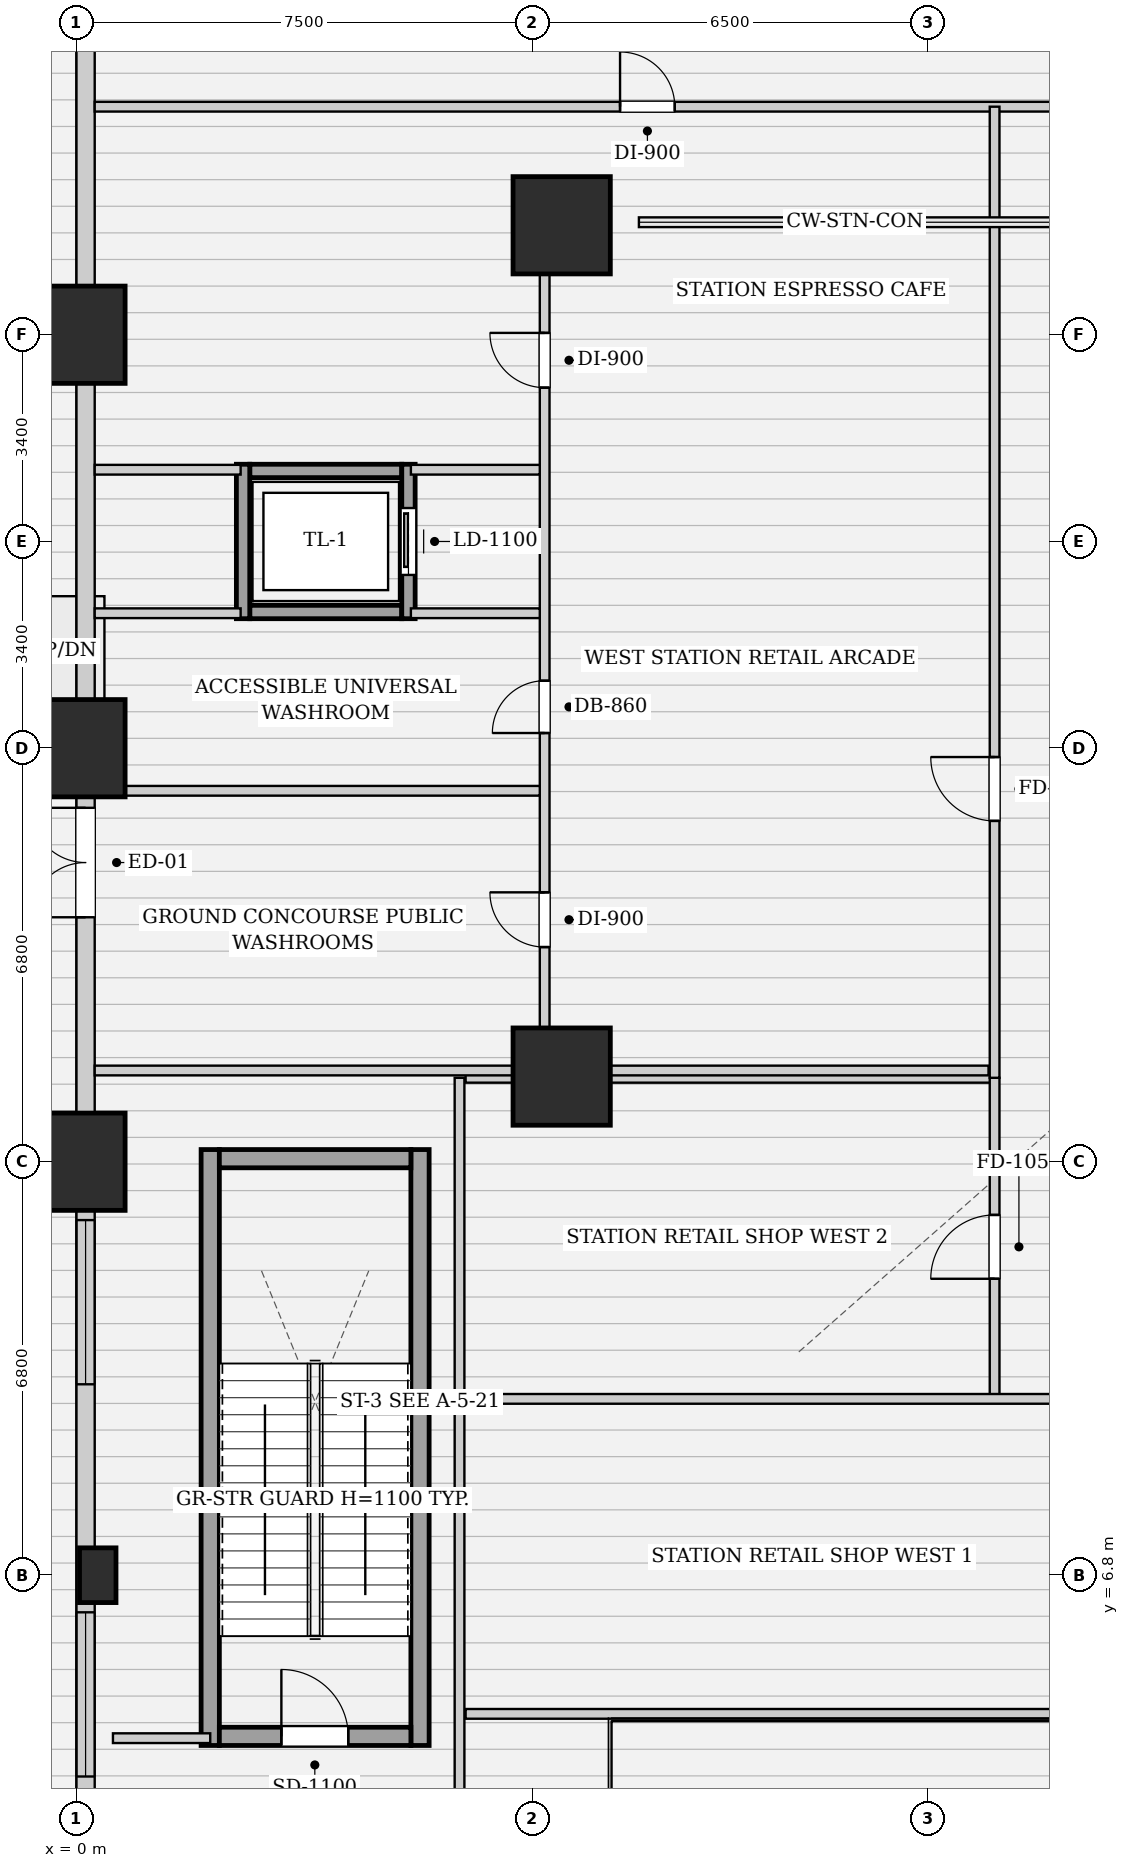
"""IFC4 building model, lengths in metres.
Left out: names, types, materials, properties, quantities, classifications, styles, units other than length and angle.
Written with IfcOpenShell. Run it as: python <this file> out.ifc"""

import sys

from ifc_helpers import new_model, si_unit, direction, frame, frame_2d, origin, origin_2d, place, context, subcontext, project, spatial, rectangle, extrude, element, fill, save


model = new_model("IFC4")
c1 = context("Model", 3, precision=1e-05, world=origin(), true_north=direction((0.0, 1.0)))
c2 = subcontext(c1, "Body", "Model", "MODEL_VIEW")
j1 = project(units=[si_unit("LENGTHUNIT", "METRE"), si_unit("PLANEANGLEUNIT", "RADIAN")], contexts=[c1])
p1 = place(None, origin())
s1 = spatial("IfcSite", under=j1, at=p1, CompositionType="ELEMENT")
p2 = place(p1, origin())
s2 = spatial("IfcBuilding", under=s1, at=p2, CompositionType="ELEMENT")
p3 = place(p2, origin())
s3 = spatial("IfcBuildingStorey", under=s2, at=p3, CompositionType="ELEMENT", Elevation=0.0)
for number, where, z_axis, x_axis in (
    (1, (0.0, 13.6, 0.0), (0.0, 0.0, 1.0), (1.0, 0.0, 0.0)),
    (2, (0.0, 20.4, 0.0), (0.0, 0.0, 1.0), (1.0, 0.0, 0.0)),
    (3, (0.0, 27.2, 0.0), (0.0, 0.0, 1.0), (1.0, 0.0, 0.0)),
    (4, (7.98, 15.0, 0.0), (0.0, 0.0, 1.0), (1.0, 0.0, 0.0)),
    (5, (7.98, 29.0, 0.0), (0.0, 0.0, 1.0), (1.0, 0.0, 0.0)),
):
    element("IfcColumn", number, at=place(p3, frame(where, z_axis=z_axis, x_axis=x_axis)), inside=s3, PredefinedType="COLUMN", context=c2, shape_type="SweptSolid", body=[
        extrude(rectangle(XDim=1.6, YDim=1.6, at=origin_2d()), origin(), (0.0, 0.0, 1.0), 6.0),
    ])
p4 = place(p3, frame((0.35, 6.8, 0.0), z_axis=(0.0, 0.0, 1.0), x_axis=(1.0, 0.0, 0.0)))
e6 = element("IfcColumn", 6, at=p4, inside=s3, PredefinedType="PILASTER", context=c2, shape_type="SweptSolid", body=[
    extrude(rectangle(XDim=0.6, YDim=0.9, at=origin_2d()), origin(), (0.0, 0.0, 1.0), 6.0),
])
p5 = place(p3, frame((0.15, 0.16, 0.0), z_axis=(0.0, 0.0, 1.0), x_axis=(0.0, 1.0, 0.0)))
e7 = element("IfcWall", 7, at=p5, inside=s3, PredefinedType="SOLIDWALL", context=c2, shape_type="SweptSolid", body=[
    extrude(rectangle(XDim=47.28, YDim=0.3, at=frame_2d((23.64, 0.0))), origin(), (0.0, 0.0, 1.0), 4.565),
])
p6 = place(p5, frame((17.46, 0.0, 0.0)))
e8 = element("IfcOpeningElement", 8, at=p6, cuts=e7, PredefinedType="OPENING", context=c2, shape_type="SweptSolid", body=[
    extrude(rectangle(XDim=1.8, YDim=2.2, at=frame_2d((0.9, 1.1))), frame((0.0, 0.16, 0.0), z_axis=(0.0, -1.0, 0.0), x_axis=(1.0, 0.0, 0.0)), (0.0, 0.0, 1.0), 0.32),
])
p7 = place(p5, frame((3.33, 0.0, 0.9)))
e9 = element("IfcOpeningElement", 9, at=p7, cuts=e7, PredefinedType="OPENING", context=c2, shape_type="SweptSolid", body=[
    extrude(rectangle(XDim=2.7, YDim=2.1, at=frame_2d((1.35, 1.05))), frame((0.0, 0.16, 0.0), z_axis=(0.0, -1.0, 0.0), x_axis=(1.0, 0.0, 0.0)), (0.0, 0.0, 1.0), 0.32),
])
p8 = place(p5, frame((9.78, 0.0, 0.9)))
e10 = element("IfcOpeningElement", 10, at=p8, cuts=e7, PredefinedType="OPENING", context=c2, shape_type="SweptSolid", body=[
    extrude(rectangle(XDim=2.7, YDim=2.1, at=frame_2d((1.35, 1.05))), frame((0.0, 0.16, 0.0), z_axis=(0.0, -1.0, 0.0), x_axis=(1.0, 0.0, 0.0)), (0.0, 0.0, 1.0), 0.32),
])
p9 = place(p5, frame((36.5, 0.0, 0.9)))
e11 = element("IfcOpeningElement", 11, at=p9, cuts=e7, PredefinedType="OPENING", context=c2, shape_type="SweptSolid", body=[
    extrude(rectangle(XDim=2.7, YDim=2.1, at=frame_2d((1.35, 1.05))), frame((0.0, 0.16, 0.0), z_axis=(0.0, -1.0, 0.0), x_axis=(1.0, 0.0, 0.0)), (0.0, 0.0, 1.0), 0.32),
])
p10 = place(p5, frame((43.0, 0.0, 0.9)))
e12 = element("IfcOpeningElement", 12, at=p10, cuts=e7, PredefinedType="OPENING", context=c2, shape_type="SweptSolid", body=[
    extrude(rectangle(XDim=2.7, YDim=2.1, at=frame_2d((1.35, 1.05))), frame((0.0, 0.16, 0.0), z_axis=(0.0, -1.0, 0.0), x_axis=(1.0, 0.0, 0.0)), (0.0, 0.0, 1.0), 0.32),
])
for number, where, z_axis, x_axis in (
    (13, (2.2, 4.0, 0.0), (0.0, 0.0, 1.0), (0.0, 1.0, 0.0)),
    (14, (5.65, 4.0, 0.0), (0.0, 0.0, 1.0), (0.0, 1.0, 0.0)),
):
    element("IfcWall", number, at=place(p3, frame(where, z_axis=z_axis, x_axis=x_axis)), inside=s3, PredefinedType="SHEAR", context=c2, shape_type="SweptSolid", body=[
        extrude(rectangle(XDim=9.8, YDim=0.3, at=frame_2d((4.9, 0.0))), origin(), (0.0, 0.0, 1.0), 5.68),
    ])
p11 = place(p3, frame((2.35, 13.65, 0.0), z_axis=(0.0, 0.0, 1.0), x_axis=(1.0, 0.0, 0.0)))
e15 = element("IfcWall", 15, at=p11, inside=s3, PredefinedType="SHEAR", context=c2, shape_type="SweptSolid", body=[
    extrude(rectangle(XDim=3.15, YDim=0.3, at=frame_2d((1.575, 0.0))), origin(), (0.0, 0.0, 1.0), 5.68),
])
p12 = place(p3, frame((2.35, 4.15, 0.0), z_axis=(0.0, 0.0, 1.0), x_axis=(1.0, 0.0, 0.0)))
e16 = element("IfcWall", 16, at=p12, inside=s3, PredefinedType="SHEAR", context=c2, shape_type="SweptSolid", body=[
    extrude(rectangle(XDim=3.15, YDim=0.3, at=frame_2d((1.575, 0.0))), origin(), (0.0, 0.0, 1.0), 5.68),
])
p13 = place(p12, frame((1.02, 0.0, 0.0)))
e17 = element("IfcOpeningElement", 17, at=p13, cuts=e16, PredefinedType="OPENING", context=c2, shape_type="SweptSolid", body=[
    extrude(rectangle(XDim=1.1, YDim=2.05, at=frame_2d((0.55, 1.025))), frame((0.0, 0.16, 0.0), z_axis=(0.0, -1.0, 0.0), x_axis=(1.0, 0.0, 0.0)), (0.0, 0.0, 1.0), 0.32),
])
for number, where, z_axis, x_axis in (
    (18, (2.85, 22.64, 0.0), (0.0, 0.0, 1.0), (1.0, 0.0, 0.0)),
    (19, (2.85, 24.96, 0.0), (0.0, 0.0, 1.0), (1.0, 0.0, 0.0)),
):
    element("IfcWall", number, at=place(p3, frame(where, z_axis=z_axis, x_axis=x_axis)), inside=s3, PredefinedType="SHEAR", context=c2, shape_type="SweptSolid", body=[
        extrude(rectangle(XDim=2.5, YDim=0.22, at=frame_2d((1.25, 0.0))), origin(), (0.0, 0.0, 1.0), 5.68),
    ])
p14 = place(p3, frame((2.74, 22.53, 0.0), z_axis=(0.0, 0.0, 1.0), x_axis=(0.0, 1.0, 0.0)))
e20 = element("IfcWall", 20, at=p14, inside=s3, PredefinedType="SHEAR", context=c2, shape_type="SweptSolid", body=[
    extrude(rectangle(XDim=2.54, YDim=0.22, at=frame_2d((1.27, 0.0))), origin(), (0.0, 0.0, 1.0), 5.68),
])
p15 = place(p3, frame((5.46, 22.53, 0.0), z_axis=(0.0, 0.0, 1.0), x_axis=(0.0, 1.0, 0.0)))
e21 = element("IfcWall", 21, at=p15, inside=s3, PredefinedType="SHEAR", context=c2, shape_type="SweptSolid", body=[
    extrude(rectangle(XDim=2.54, YDim=0.22, at=frame_2d((1.27, 0.0))), origin(), (0.0, 0.0, 1.0), 5.68),
])
p16 = place(p15, frame((0.72, 0.0, 0.0)))
e22 = element("IfcOpeningElement", 22, at=p16, cuts=e21, PredefinedType="OPENING", context=c2, shape_type="SweptSolid", body=[
    extrude(rectangle(XDim=1.1, YDim=2.15, at=frame_2d((0.55, 1.075))), frame((0.0, 0.12, 0.0), z_axis=(0.0, -1.0, 0.0), x_axis=(1.0, 0.0, 0.0)), (0.0, 0.0, 1.0), 0.24),
])
p17 = place(p3, frame((6.4, 14.98, 0.0), z_axis=(0.0, 0.0, 1.0), x_axis=(1.0, 0.0, 0.0)))
e23 = element("IfcWall", 23, at=p17, inside=s3, PredefinedType="PARTITIONING", context=c2, shape_type="SweptSolid", body=[
    extrude(rectangle(XDim=8.7, YDim=0.16, at=frame_2d((4.35, 0.0))), origin(), (0.0, 0.0, 1.0), 4.565),
])
p18 = place(p3, frame((15.1, 9.7, 0.0), z_axis=(0.0, 0.0, 1.0), x_axis=(0.0, 1.0, 0.0)))
e24 = element("IfcWall", 24, at=p18, inside=s3, PredefinedType="PARTITIONING", context=c2, shape_type="SweptSolid", body=[
    extrude(rectangle(XDim=5.28, YDim=0.16, at=frame_2d((2.64, 0.0))), origin(), (0.0, 0.0, 1.0), 5.68),
])
p19 = place(p18, frame((1.975, 0.0, 0.0)))
e25 = element("IfcOpeningElement", 25, at=p19, cuts=e24, PredefinedType="OPENING", context=c2, shape_type="SweptSolid", body=[
    extrude(rectangle(XDim=1.05, YDim=2.05, at=frame_2d((0.525, 1.025))), frame((0.0, 0.09, 0.0), z_axis=(0.0, -1.0, 0.0), x_axis=(1.0, 0.0, 0.0)), (0.0, 0.0, 1.0), 0.18),
])
p20 = place(p3, frame((6.4, 4.52, 0.0), z_axis=(0.0, 0.0, 1.0), x_axis=(1.0, 0.0, 0.0)))
e26 = element("IfcWall", 26, at=p20, inside=s3, PredefinedType="PARTITIONING", context=c2, shape_type="SweptSolid", body=[
    extrude(rectangle(XDim=40.9, YDim=0.16, at=frame_2d((20.45, 0.0))), origin(), (0.0, 0.0, 1.0), 5.68),
])
p21 = place(p3, frame((0.6, 4.12, 0.0), z_axis=(0.0, 0.0, 1.0), x_axis=(1.0, 0.0, 0.0)))
e27 = element("IfcWall", 27, at=p21, inside=s3, PredefinedType="PARTITIONING", context=c2, shape_type="SweptSolid", body=[
    extrude(rectangle(XDim=1.6, YDim=0.16, at=frame_2d((0.8, 0.0))), origin(), (0.0, 0.0, 1.0), 5.68),
])
p22 = place(p3, frame((6.3, 0.3, 0.0), z_axis=(0.0, 0.0, 1.0), x_axis=(0.0, 1.0, 0.0)))
e28 = element("IfcWall", 28, at=p22, inside=s3, PredefinedType="PARTITIONING", context=c2, shape_type="SweptSolid", body=[
    extrude(rectangle(XDim=14.68, YDim=0.16, at=frame_2d((7.34, 0.0))), origin(), (0.0, 0.0, 1.0), 5.68),
])
p23 = place(p3, frame((6.4, 9.7, 0.0), z_axis=(0.0, 0.0, 1.0), x_axis=(1.0, 0.0, 0.0)))
e29 = element("IfcWall", 29, at=p23, inside=s3, PredefinedType="PARTITIONING", context=c2, shape_type="SweptSolid", body=[
    extrude(rectangle(XDim=11.45, YDim=0.16, at=frame_2d((5.725, 0.0))), origin(), (0.0, 0.0, 1.0), 5.68),
])
p24 = place(p3, frame((0.3, 30.95, 0.0), z_axis=(0.0, 0.0, 1.0), x_axis=(1.0, 0.0, 0.0)))
e30 = element("IfcWall", 30, at=p24, inside=s3, PredefinedType="PARTITIONING", context=c2, shape_type="SweptSolid", body=[
    extrude(rectangle(XDim=47.35, YDim=0.16, at=frame_2d((23.675, 0.0))), origin(), (0.0, 0.0, 1.0), 5.68),
])
p25 = place(p24, frame((17.975, 0.0, 0.0)))
e31 = element("IfcOpeningElement", 31, at=p25, cuts=e30, PredefinedType="OPENING", context=c2, shape_type="SweptSolid", body=[
    extrude(rectangle(XDim=1.05, YDim=2.05, at=frame_2d((0.525, 1.025))), frame((0.0, 0.09, 0.0), z_axis=(0.0, -1.0, 0.0), x_axis=(1.0, 0.0, 0.0)), (0.0, 0.0, 1.0), 0.18),
])
p26 = place(p24, frame((28.475, 0.0, 0.0)))
e32 = element("IfcOpeningElement", 32, at=p26, cuts=e30, PredefinedType="OPENING", context=c2, shape_type="SweptSolid", body=[
    extrude(rectangle(XDim=1.05, YDim=2.05, at=frame_2d((0.525, 1.025))), frame((0.0, 0.09, 0.0), z_axis=(0.0, -1.0, 0.0), x_axis=(1.0, 0.0, 0.0)), (0.0, 0.0, 1.0), 0.18),
])
p27 = place(p24, frame((8.64, 0.0, 0.0)))
e33 = element("IfcOpeningElement", 33, at=p27, cuts=e30, PredefinedType="OPENING", context=c2, shape_type="SweptSolid", body=[
    extrude(rectangle(XDim=0.9, YDim=2.05, at=frame_2d((0.45, 1.025))), frame((0.0, 0.09, 0.0), z_axis=(0.0, -1.0, 0.0), x_axis=(1.0, 0.0, 0.0)), (0.0, 0.0, 1.0), 0.18),
])
p28 = place(p3, frame((15.1, 14.98, 0.0), z_axis=(0.0, 0.0, 1.0), x_axis=(0.0, 1.0, 0.0)))
e34 = element("IfcWall", 34, at=p28, inside=s3, PredefinedType="PARTITIONING", context=c2, shape_type="SweptSolid", body=[
    extrude(rectangle(XDim=15.97, YDim=0.16, at=frame_2d((7.985, 0.0))), origin(), (0.0, 0.0, 1.0), 5.68),
])
p29 = place(p28, frame((4.225, 0.0, 0.0)))
e35 = element("IfcOpeningElement", 35, at=p29, cuts=e34, PredefinedType="OPENING", context=c2, shape_type="SweptSolid", body=[
    extrude(rectangle(XDim=1.05, YDim=2.05, at=frame_2d((0.525, 1.025))), frame((0.0, 0.09, 0.0), z_axis=(0.0, -1.0, 0.0), x_axis=(1.0, 0.0, 0.0)), (0.0, 0.0, 1.0), 0.18),
])
p30 = place(p3, frame((0.3, 15.1, 0.0), z_axis=(0.0, 0.0, 1.0), x_axis=(1.0, 0.0, 0.0)))
e36 = element("IfcWall", 36, at=p30, inside=s3, PredefinedType="PARTITIONING", context=c2, shape_type="SweptSolid", body=[
    extrude(rectangle(XDim=14.7, YDim=0.16, at=frame_2d((7.35, 0.0))), origin(), (0.0, 0.0, 1.0), 4.565),
])
p31 = place(p3, frame((7.7, 15.18, 0.0), z_axis=(0.0, 0.0, 1.0), x_axis=(0.0, 1.0, 0.0)))
e37 = element("IfcWall", 37, at=p31, inside=s3, PredefinedType="PARTITIONING", context=c2, shape_type="SweptSolid", body=[
    extrude(rectangle(XDim=13.7, YDim=0.16, at=frame_2d((6.85, 0.0))), origin(), (0.0, 0.0, 1.0), 5.68),
])
p32 = place(p31, frame((1.95, 0.0, 0.0)))
e38 = element("IfcOpeningElement", 38, at=p32, cuts=e37, PredefinedType="OPENING", context=c2, shape_type="SweptSolid", body=[
    extrude(rectangle(XDim=0.9, YDim=2.05, at=frame_2d((0.45, 1.025))), frame((0.0, 0.09, 0.0), z_axis=(0.0, -1.0, 0.0), x_axis=(1.0, 0.0, 0.0)), (0.0, 0.0, 1.0), 0.18),
])
p33 = place(p31, frame((5.47, 0.0, 0.0)))
e39 = element("IfcOpeningElement", 39, at=p33, cuts=e37, PredefinedType="OPENING", context=c2, shape_type="SweptSolid", body=[
    extrude(rectangle(XDim=0.86, YDim=2.05, at=frame_2d((0.43, 1.025))), frame((0.0, 0.09, 0.0), z_axis=(0.0, -1.0, 0.0), x_axis=(1.0, 0.0, 0.0)), (0.0, 0.0, 1.0), 0.18),
])
p34 = place(p31, frame((11.15, 0.0, 0.0)))
e40 = element("IfcOpeningElement", 40, at=p34, cuts=e37, PredefinedType="OPENING", context=c2, shape_type="SweptSolid", body=[
    extrude(rectangle(XDim=0.9, YDim=2.05, at=frame_2d((0.45, 1.025))), frame((0.0, 0.09, 0.0), z_axis=(0.0, -1.0, 0.0), x_axis=(1.0, 0.0, 0.0)), (0.0, 0.0, 1.0), 0.18),
])
p35 = place(p3, frame((0.3, 19.7, 0.0), z_axis=(0.0, 0.0, 1.0), x_axis=(1.0, 0.0, 0.0)))
e41 = element("IfcWall", 41, at=p35, inside=s3, PredefinedType="PARTITIONING", context=c2, shape_type="SweptSolid", body=[
    extrude(rectangle(XDim=7.32, YDim=0.16, at=frame_2d((3.66, 0.0))), origin(), (0.0, 0.0, 1.0), 5.68),
])
p36 = place(p3, frame((0.3, 22.62, 0.0), z_axis=(0.0, 0.0, 1.0), x_axis=(1.0, 0.0, 0.0)))
e42 = element("IfcWall", 42, at=p36, inside=s3, PredefinedType="PARTITIONING", context=c2, shape_type="SweptSolid", body=[
    extrude(rectangle(XDim=2.4, YDim=0.16, at=frame_2d((1.2, 0.0))), origin(), (0.0, 0.0, 1.0), 5.68),
])
p37 = place(p3, frame((5.5, 22.62, 0.0), z_axis=(0.0, 0.0, 1.0), x_axis=(1.0, 0.0, 0.0)))
e43 = element("IfcWall", 43, at=p37, inside=s3, PredefinedType="PARTITIONING", context=c2, shape_type="SweptSolid", body=[
    extrude(rectangle(XDim=2.12, YDim=0.16, at=frame_2d((1.06, 0.0))), origin(), (0.0, 0.0, 1.0), 5.68),
])
p38 = place(p3, frame((0.3, 24.98, 0.0), z_axis=(0.0, 0.0, 1.0), x_axis=(1.0, 0.0, 0.0)))
e44 = element("IfcWall", 44, at=p38, inside=s3, PredefinedType="PARTITIONING", context=c2, shape_type="SweptSolid", body=[
    extrude(rectangle(XDim=2.4, YDim=0.16, at=frame_2d((1.2, 0.0))), origin(), (0.0, 0.0, 1.0), 5.68),
])
p39 = place(p3, frame((5.5, 24.98, 0.0), z_axis=(0.0, 0.0, 1.0), x_axis=(1.0, 0.0, 0.0)))
e45 = element("IfcWall", 45, at=p39, inside=s3, PredefinedType="PARTITIONING", context=c2, shape_type="SweptSolid", body=[
    extrude(rectangle(XDim=2.12, YDim=0.16, at=frame_2d((1.06, 0.0))), origin(), (0.0, 0.0, 1.0), 5.68),
])
p40 = place(p6, origin())
e46 = element("IfcDoor", 46, at=p40, inside=s3, OperationType="DOUBLE_SWING_LEFT", PredefinedType="DOOR", context=c2, shape_type="SweptSolid", body=[
    extrude(rectangle(XDim=1.8, YDim=2.2, at=frame_2d((0.9, 1.1))), frame((0.0, 0.025, 0.0), z_axis=(0.0, -1.0, 0.0), x_axis=(1.0, 0.0, 0.0)), (0.0, 0.0, 1.0), 0.05),
])
fill(e8, e46)
p41 = place(p13, origin())
e47 = element("IfcDoor", 47, at=p41, inside=s3, OperationType="SINGLE_SWING_LEFT", PredefinedType="DOOR", context=c2, shape_type="SweptSolid", body=[
    extrude(rectangle(XDim=1.1, YDim=2.05, at=frame_2d((0.55, 1.025))), frame((0.0, 0.025, 0.0), z_axis=(0.0, -1.0, 0.0), x_axis=(1.0, 0.0, 0.0)), (0.0, 0.0, 1.0), 0.05),
])
fill(e17, e47)
p42 = place(p16, origin())
e48 = element("IfcDoor", 48, at=p42, inside=s3, OperationType="SLIDING_TO_LEFT", PredefinedType="DOOR", context=c2, shape_type="SweptSolid", body=[
    extrude(rectangle(XDim=1.1, YDim=2.15, at=frame_2d((0.55, 1.075))), frame((0.0, 0.025, 0.0), z_axis=(0.0, -1.0, 0.0), x_axis=(1.0, 0.0, 0.0)), (0.0, 0.0, 1.0), 0.05),
])
fill(e22, e48)
p43 = place(p19, origin())
e49 = element("IfcDoor", 49, at=p43, inside=s3, OperationType="SINGLE_SWING_LEFT", PredefinedType="DOOR", context=c2, shape_type="SweptSolid", body=[
    extrude(rectangle(XDim=1.05, YDim=2.05, at=frame_2d((0.525, 1.025))), frame((0.0, 0.025, 0.0), z_axis=(0.0, -1.0, 0.0), x_axis=(1.0, 0.0, 0.0)), (0.0, 0.0, 1.0), 0.05),
])
fill(e25, e49)
p44 = place(p27, origin())
e50 = element("IfcDoor", 50, at=p44, inside=s3, OperationType="SINGLE_SWING_LEFT", PredefinedType="DOOR", context=c2, shape_type="SweptSolid", body=[
    extrude(rectangle(XDim=0.9, YDim=2.05, at=frame_2d((0.45, 1.025))), frame((0.0, 0.025, 0.0), z_axis=(0.0, -1.0, 0.0), x_axis=(1.0, 0.0, 0.0)), (0.0, 0.0, 1.0), 0.05),
])
fill(e33, e50)
p45 = place(p29, origin())
e51 = element("IfcDoor", 51, at=p45, inside=s3, OperationType="SINGLE_SWING_RIGHT", PredefinedType="DOOR", context=c2, shape_type="SweptSolid", body=[
    extrude(rectangle(XDim=1.05, YDim=2.05, at=frame_2d((0.525, 1.025))), frame((0.0, 0.025, 0.0), z_axis=(0.0, -1.0, 0.0), x_axis=(1.0, 0.0, 0.0)), (0.0, 0.0, 1.0), 0.05),
])
fill(e35, e51)
p46 = place(p32, origin())
e52 = element("IfcDoor", 52, at=p46, inside=s3, OperationType="SINGLE_SWING_RIGHT", PredefinedType="DOOR", context=c2, shape_type="SweptSolid", body=[
    extrude(rectangle(XDim=0.9, YDim=2.05, at=frame_2d((0.45, 1.025))), frame((0.0, 0.025, 0.0), z_axis=(0.0, -1.0, 0.0), x_axis=(1.0, 0.0, 0.0)), (0.0, 0.0, 1.0), 0.05),
])
fill(e38, e52)
p47 = place(p33, origin())
e53 = element("IfcDoor", 53, at=p47, inside=s3, OperationType="SINGLE_SWING_LEFT", PredefinedType="DOOR", context=c2, shape_type="SweptSolid", body=[
    extrude(rectangle(XDim=0.86, YDim=2.05, at=frame_2d((0.43, 1.025))), frame((0.0, 0.025, 0.0), z_axis=(0.0, -1.0, 0.0), x_axis=(1.0, 0.0, 0.0)), (0.0, 0.0, 1.0), 0.05),
])
fill(e39, e53)
p48 = place(p34, origin())
e54 = element("IfcDoor", 54, at=p48, inside=s3, OperationType="SINGLE_SWING_RIGHT", PredefinedType="DOOR", context=c2, shape_type="SweptSolid", body=[
    extrude(rectangle(XDim=0.9, YDim=2.05, at=frame_2d((0.45, 1.025))), frame((0.0, 0.025, 0.0), z_axis=(0.0, -1.0, 0.0), x_axis=(1.0, 0.0, 0.0)), (0.0, 0.0, 1.0), 0.05),
])
fill(e40, e54)
p49 = place(p7, origin())
e55 = element("IfcWindow", 55, at=p49, inside=s3, PartitioningType="TRIPLE_PANEL_VERTICAL", PredefinedType="WINDOW", context=c2, shape_type="SweptSolid", body=[
    extrude(rectangle(XDim=2.7, YDim=2.1, at=frame_2d((1.35, 1.05))), frame((0.0, 0.03, 0.0), z_axis=(0.0, -1.0, 0.0), x_axis=(1.0, 0.0, 0.0)), (0.0, 0.0, 1.0), 0.06),
])
fill(e9, e55)
p50 = place(p8, origin())
e56 = element("IfcWindow", 56, at=p50, inside=s3, PartitioningType="TRIPLE_PANEL_VERTICAL", PredefinedType="WINDOW", context=c2, shape_type="SweptSolid", body=[
    extrude(rectangle(XDim=2.7, YDim=2.1, at=frame_2d((1.35, 1.05))), frame((0.0, 0.03, 0.0), z_axis=(0.0, -1.0, 0.0), x_axis=(1.0, 0.0, 0.0)), (0.0, 0.0, 1.0), 0.06),
])
fill(e10, e56)
save(model, sys.argv[1])
